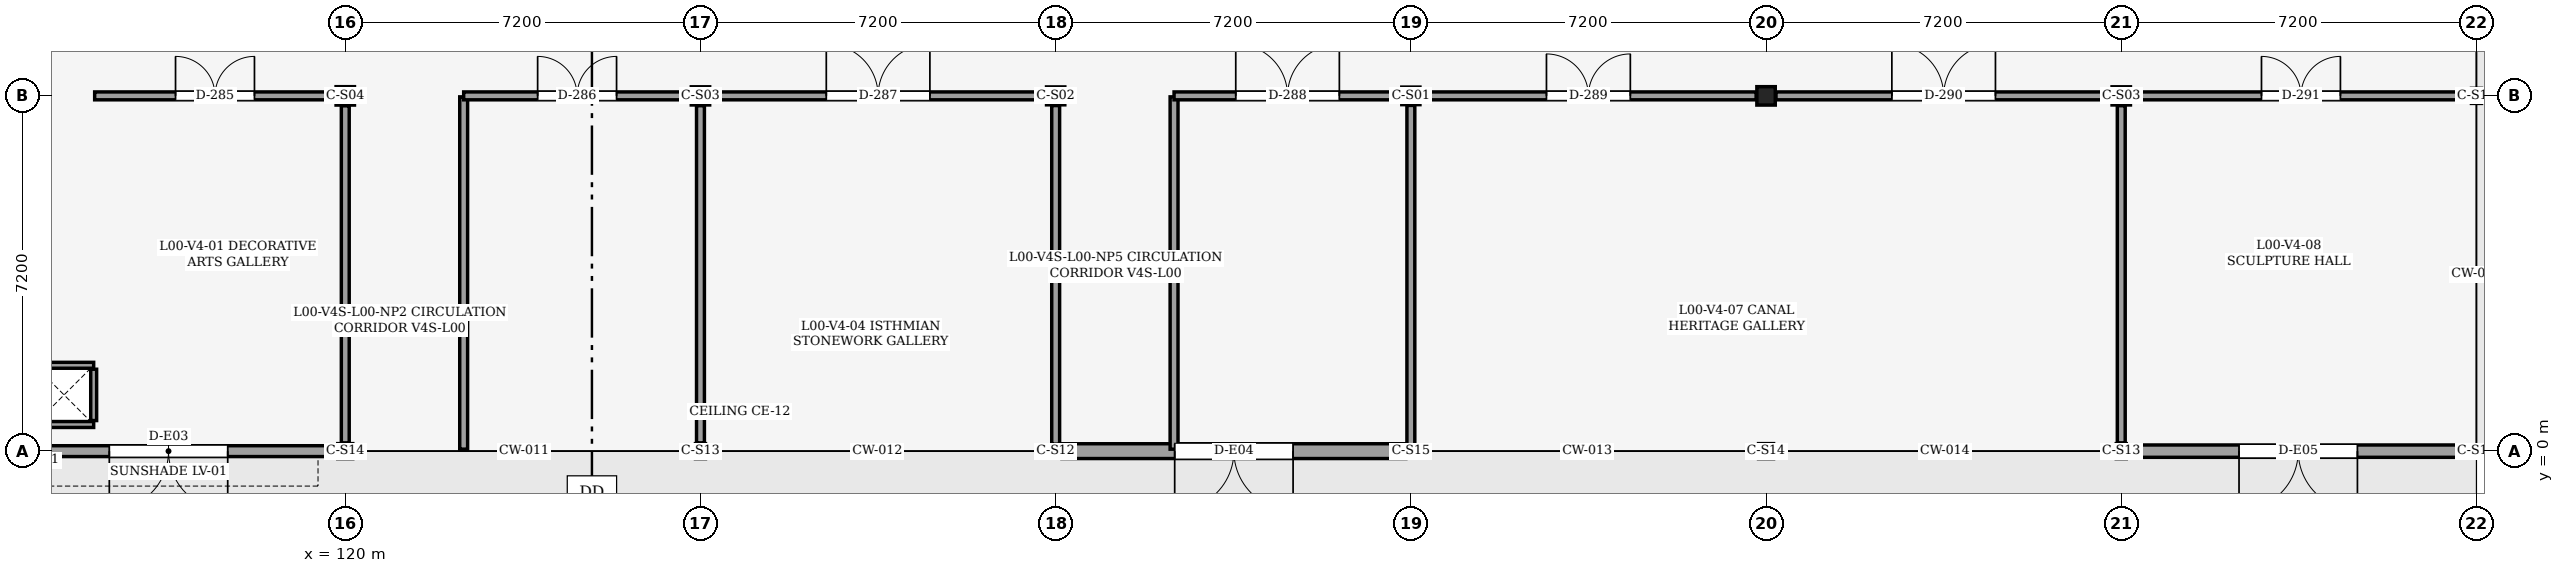
"""IFC4 building model, lengths in metres.
Left out: names, types, materials, properties, quantities, classifications, styles, units other than length and angle.
Written with IfcOpenShell. Run it as: python <this file> out.ifc"""

import sys

from ifc_helpers import new_model, si_unit, direction, frame, frame_2d, origin, origin_2d, place, context, subcontext, project, spatial, rectangle, hollow_rectangle, i_section, extrude, element, fill, save


model = new_model("IFC4")
c1 = context("Model", 3, precision=1e-05, world=origin(), true_north=direction((0.0, 1.0)))
c2 = subcontext(c1, "Body", "Model", "MODEL_VIEW")
j1 = project(units=[si_unit("LENGTHUNIT", "METRE"), si_unit("PLANEANGLEUNIT", "RADIAN")], contexts=[c1])
p1 = place(None, origin())
s1 = spatial("IfcSite", under=j1, at=p1, CompositionType="ELEMENT")
p2 = place(p1, origin())
s2 = spatial("IfcBuilding", under=s1, at=p2, CompositionType="ELEMENT")
p3 = place(p2, origin())
s3 = spatial("IfcBuildingStorey", under=s2, at=p3, CompositionType="ELEMENT", Elevation=0.0)
p4 = place(p3, frame((120.0, 0.0, 0.0), z_axis=(0.0, 0.0, 1.0), x_axis=(1.0, 0.0, 0.0)))
e1 = element("IfcColumn", 1, at=p4, inside=s3, PredefinedType="COLUMN", context=c2, shape_type="SweptSolid", body=[
    extrude(hollow_rectangle(XDim=0.305, YDim=0.305, WallThickness=0.016, OuterFilletRadius=0.032, at=origin_2d()), origin(), (0.0, 0.0, 1.0), 5.4),
])
p5 = place(p3, frame((120.0, 7.2, 0.0), z_axis=(0.0, 0.0, 1.0), x_axis=(1.0, 0.0, 0.0)))
e2 = element("IfcColumn", 2, at=p5, inside=s3, PredefinedType="COLUMN", context=c2, shape_type="SweptSolid", body=[
    extrude(i_section(OverallWidth=0.373, OverallDepth=0.373, WebThickness=0.016, FlangeThickness=0.026, FilletRadius=0.025, at=origin_2d()), origin(), (0.0, 0.0, 1.0), 5.4),
])
p6 = place(p3, frame((127.2, 0.0, 0.0), z_axis=(0.0, 0.0, 1.0), x_axis=(1.0, 0.0, 0.0)))
e3 = element("IfcColumn", 3, at=p6, inside=s3, PredefinedType="COLUMN", context=c2, shape_type="SweptSolid", body=[
    extrude(hollow_rectangle(XDim=0.203, YDim=0.305, WallThickness=0.013, OuterFilletRadius=0.025, at=origin_2d()), origin(), (0.0, 0.0, 1.0), 5.4),
])
p7 = place(p3, frame((127.2, 7.2, 0.0), z_axis=(0.0, 0.0, 1.0), x_axis=(1.0, 0.0, 0.0)))
e4 = element("IfcColumn", 4, at=p7, inside=s3, PredefinedType="COLUMN", context=c2, shape_type="SweptSolid", body=[
    extrude(i_section(OverallWidth=0.373, OverallDepth=0.368, WebThickness=0.015, FlangeThickness=0.024, FilletRadius=0.025, at=origin_2d()), origin(), (0.0, 0.0, 1.0), 5.4),
])
p8 = place(p3, frame((134.4, 0.0, 0.0), z_axis=(0.0, 0.0, 1.0), x_axis=(1.0, 0.0, 0.0)))
e5 = element("IfcColumn", 5, at=p8, inside=s3, PredefinedType="COLUMN", context=c2, shape_type="SweptSolid", body=[
    extrude(hollow_rectangle(XDim=0.254, YDim=0.254, WallThickness=0.013, OuterFilletRadius=0.025, at=origin_2d()), origin(), (0.0, 0.0, 1.0), 5.4),
])
p9 = place(p3, frame((134.4, 7.2, 0.0), z_axis=(0.0, 0.0, 1.0), x_axis=(1.0, 0.0, 0.0)))
e6 = element("IfcColumn", 6, at=p9, inside=s3, PredefinedType="COLUMN", context=c2, shape_type="SweptSolid", body=[
    extrude(i_section(OverallWidth=0.371, OverallDepth=0.363, WebThickness=0.013, FlangeThickness=0.022, FilletRadius=0.025, at=origin_2d()), origin(), (0.0, 0.0, 1.0), 5.4),
])
p10 = place(p3, frame((141.6, 0.0, 0.0), z_axis=(0.0, 0.0, 1.0), x_axis=(1.0, 0.0, 0.0)))
e7 = element("IfcColumn", 7, at=p10, inside=s3, PredefinedType="COLUMN", context=c2, shape_type="SweptSolid", body=[
    extrude(hollow_rectangle(XDim=0.203, YDim=0.203, WallThickness=0.013, OuterFilletRadius=0.025, at=origin_2d()), origin(), (0.0, 0.0, 1.0), 5.4),
])
p11 = place(p3, frame((141.6, 7.2, 0.0), z_axis=(0.0, 0.0, 1.0), x_axis=(1.0, 0.0, 0.0)))
e8 = element("IfcColumn", 8, at=p11, inside=s3, PredefinedType="COLUMN", context=c2, shape_type="SweptSolid", body=[
    extrude(i_section(OverallWidth=0.368, OverallDepth=0.356, WebThickness=0.011, FlangeThickness=0.018, FilletRadius=0.025, at=origin_2d()), origin(), (0.0, 0.0, 1.0), 5.4),
])
p12 = place(p3, frame((148.8, 0.0, 0.0), z_axis=(0.0, 0.0, 1.0), x_axis=(1.0, 0.0, 0.0)))
e9 = element("IfcColumn", 9, at=p12, inside=s3, PredefinedType="COLUMN", context=c2, shape_type="SweptSolid", body=[
    extrude(hollow_rectangle(XDim=0.305, YDim=0.305, WallThickness=0.016, OuterFilletRadius=0.032, at=origin_2d()), origin(), (0.0, 0.0, 1.0), 5.4),
])
p13 = place(p3, frame((148.8, 7.2, 0.0), z_axis=(0.0, 0.0, 1.0), x_axis=(1.0, 0.0, 0.0)))
e10 = element("IfcColumn", 10, at=p13, inside=s3, PredefinedType="COLUMN", context=c2, shape_type="SweptSolid", body=[
    extrude(i_section(OverallWidth=0.373, OverallDepth=0.373, WebThickness=0.016, FlangeThickness=0.026, FilletRadius=0.025, at=origin_2d()), origin(), (0.0, 0.0, 1.0), 5.4),
])
p14 = place(p3, frame((156.0, 0.0, 0.0), z_axis=(0.0, 0.0, 1.0), x_axis=(1.0, 0.0, 0.0)))
e11 = element("IfcColumn", 11, at=p14, inside=s3, PredefinedType="COLUMN", context=c2, shape_type="SweptSolid", body=[
    extrude(hollow_rectangle(XDim=0.203, YDim=0.305, WallThickness=0.013, OuterFilletRadius=0.025, at=origin_2d()), origin(), (0.0, 0.0, 1.0), 5.4),
])
p15 = place(p3, frame((156.0, 7.2, 0.0), z_axis=(0.0, 0.0, 1.0), x_axis=(1.0, 0.0, 0.0)))
e12 = element("IfcColumn", 12, at=p15, inside=s3, PredefinedType="COLUMN", context=c2, shape_type="SweptSolid", body=[
    extrude(i_section(OverallWidth=0.373, OverallDepth=0.368, WebThickness=0.015, FlangeThickness=0.024, FilletRadius=0.025, at=origin_2d()), origin(), (0.0, 0.0, 1.0), 5.4),
])
p16 = place(p3, frame((163.2, 0.0, 0.0), z_axis=(0.0, 0.0, 1.0), x_axis=(1.0, 0.0, 0.0)))
e13 = element("IfcColumn", 13, at=p16, inside=s3, PredefinedType="COLUMN", context=c2, shape_type="SweptSolid", body=[
    extrude(hollow_rectangle(XDim=0.254, YDim=0.254, WallThickness=0.013, OuterFilletRadius=0.025, at=origin_2d()), origin(), (0.0, 0.0, 1.0), 5.4),
])
p17 = place(p3, frame((163.2, 7.2, 0.0), z_axis=(0.0, 0.0, 1.0), x_axis=(1.0, 0.0, 0.0)))
e14 = element("IfcColumn", 14, at=p17, inside=s3, PredefinedType="COLUMN", context=c2, shape_type="SweptSolid", body=[
    extrude(hollow_rectangle(XDim=0.203, YDim=0.305, WallThickness=0.013, OuterFilletRadius=0.025, at=origin_2d()), origin(), (0.0, 0.0, 1.0), 5.4),
])
p18 = place(p3, frame((119.848, 0.0, 0.0), z_axis=(0.0, 0.0, 1.0), x_axis=(-1.0, 0.0, 0.0)))
e15 = element("IfcWall", 15, at=p18, inside=s3, PredefinedType="SOLIDWALL", context=c2, shape_type="SweptSolid", body=[
    extrude(rectangle(XDim=6.861, YDim=0.22, at=frame_2d((3.431, 0.0))), origin(), (0.0, 0.0, 1.0), 4.533),
])
p19 = place(p18, frame((2.231, 0.0, 0.0)))
e16 = element("IfcOpeningElement", 16, at=p19, cuts=e15, PredefinedType="OPENING", context=c2, shape_type="SweptSolid", body=[
    extrude(rectangle(XDim=2.4, YDim=2.5, at=frame_2d((1.2, 1.25))), frame((0.0, 0.12, 0.0), z_axis=(0.0, -1.0, 0.0), x_axis=(1.0, 0.0, 0.0)), (0.0, 0.0, 1.0), 0.24),
])
p20 = place(p3, frame((141.498, 0.0, 0.0), z_axis=(0.0, 0.0, 1.0), x_axis=(-1.0, 0.0, 0.0)))
e17 = element("IfcWall", 17, at=p20, inside=s3, PredefinedType="SOLIDWALL", context=c2, shape_type="SweptSolid", body=[
    extrude(rectangle(XDim=6.971, YDim=0.3, at=frame_2d((3.486, 0.0))), origin(), (0.0, 0.0, 1.0), 4.678),
])
p21 = place(p20, frame((2.286, 0.0, 0.0)))
e18 = element("IfcOpeningElement", 18, at=p21, cuts=e17, PredefinedType="OPENING", context=c2, shape_type="SweptSolid", body=[
    extrude(rectangle(XDim=2.4, YDim=2.5, at=frame_2d((1.2, 1.25))), frame((0.0, 0.16, 0.0), z_axis=(0.0, -1.0, 0.0), x_axis=(1.0, 0.0, 0.0)), (0.0, 0.0, 1.0), 0.321),
])
p22 = place(p3, frame((163.073, 0.0, 0.0), z_axis=(0.0, 0.0, 1.0), x_axis=(-1.0, 0.0, 0.0)))
e19 = element("IfcWall", 19, at=p22, inside=s3, PredefinedType="SOLIDWALL", context=c2, shape_type="SweptSolid", body=[
    extrude(rectangle(XDim=6.971, YDim=0.25, at=frame_2d((3.486, 0.0))), origin(), (0.0, 0.0, 1.0), 4.607),
])
p23 = place(p22, frame((2.286, 0.0, 0.0)))
e20 = element("IfcOpeningElement", 20, at=p23, cuts=e19, PredefinedType="OPENING", context=c2, shape_type="SweptSolid", body=[
    extrude(rectangle(XDim=2.4, YDim=2.5, at=frame_2d((1.2, 1.25))), frame((0.0, 0.135, 0.0), z_axis=(0.0, -1.0, 0.0), x_axis=(1.0, 0.0, 0.0)), (0.0, 0.0, 1.0), 0.271),
])
for number, where, z_axis, x_axis in (
    (21, (113.7, 0.54, 0.0), (0.0, 0.0, 1.0), (1.0, 0.0, 0.0)),
    (22, (113.7, 1.74, 0.0), (0.0, 0.0, 1.0), (1.0, 0.0, 0.0)),
):
    element("IfcWall", number, at=place(p3, frame(where, z_axis=z_axis, x_axis=x_axis)), inside=s3, PredefinedType="PARTITIONING", context=c2, shape_type="SweptSolid", body=[
        extrude(rectangle(XDim=1.2, YDim=0.12, at=frame_2d((0.6, 0.0))), origin(), (0.0, 0.0, 1.0), 5.16),
    ])
p24 = place(p3, frame((114.9, 0.62, 0.0), z_axis=(0.0, 0.0, 1.0), x_axis=(0.0, 1.0, 0.0)))
e23 = element("IfcWall", 23, at=p24, inside=s3, PredefinedType="PARTITIONING", context=c2, shape_type="SweptSolid", body=[
    extrude(rectangle(XDim=1.04, YDim=0.12, at=frame_2d((0.52, 0.0))), origin(), (0.0, 0.0, 1.0), 5.16),
])
p25 = place(p3, frame((114.92, 7.2, 0.0), z_axis=(0.0, 0.0, 1.0), x_axis=(1.0, 0.0, 0.0)))
e24 = element("IfcWall", 24, at=p25, inside=s3, PredefinedType="PARTITIONING", context=c2, shape_type="SweptSolid", body=[
    extrude(rectangle(XDim=4.879, YDim=0.16, at=frame_2d((2.439, 0.0))), origin(), (0.0, 0.0, 1.0), 4.591),
])
p26 = place(p25, frame((1.639, 0.0, 0.0)))
e25 = element("IfcOpeningElement", 25, at=p26, cuts=e24, PredefinedType="OPENING", context=c2, shape_type="SweptSolid", body=[
    extrude(rectangle(XDim=1.6, YDim=2.35, at=frame_2d((0.8, 1.175))), frame((0.0, 0.09, 0.0), z_axis=(0.0, -1.0, 0.0), x_axis=(1.0, 0.0, 0.0)), (0.0, 0.0, 1.0), 0.18),
])
p27 = place(p3, frame((120.0, 0.167, 0.0), z_axis=(0.0, 0.0, 1.0), x_axis=(0.0, 1.0, 0.0)))
e26 = element("IfcWall", 26, at=p27, inside=s3, PredefinedType="PARTITIONING", context=c2, shape_type="SweptSolid", body=[
    extrude(rectangle(XDim=6.831, YDim=0.16, at=frame_2d((3.416, 0.0))), origin(), (0.0, 0.0, 1.0), 4.533),
])
p28 = place(p3, frame((122.4, 0.04, 0.0), z_axis=(0.0, 0.0, 1.0), x_axis=(0.0, 1.0, 0.0)))
e27 = element("IfcWall", 27, at=p28, inside=s3, PredefinedType="PARTITIONING", context=c2, shape_type="SweptSolid", body=[
    extrude(rectangle(XDim=7.14, YDim=0.16, at=frame_2d((3.57, 0.0))), origin(), (0.0, 0.0, 1.0), 5.14),
])
p29 = place(p3, frame((122.4, 7.2, 0.0), z_axis=(0.0, 0.0, 1.0), x_axis=(1.0, 0.0, 0.0)))
e28 = element("IfcWall", 28, at=p29, inside=s3, PredefinedType="PARTITIONING", context=c2, shape_type="SweptSolid", body=[
    extrude(rectangle(XDim=4.599, YDim=0.16, at=frame_2d((2.299, 0.0))), origin(), (0.0, 0.0, 1.0), 4.607),
])
p30 = place(p29, frame((1.499, 0.0, 0.0)))
e29 = element("IfcOpeningElement", 29, at=p30, cuts=e28, PredefinedType="OPENING", context=c2, shape_type="SweptSolid", body=[
    extrude(rectangle(XDim=1.6, YDim=2.35, at=frame_2d((0.8, 1.175))), frame((0.0, 0.09, 0.0), z_axis=(0.0, -1.0, 0.0), x_axis=(1.0, 0.0, 0.0)), (0.0, 0.0, 1.0), 0.18),
])
p31 = place(p3, frame((127.2, 0.167, 0.0), z_axis=(0.0, 0.0, 1.0), x_axis=(0.0, 1.0, 0.0)))
e30 = element("IfcWall", 30, at=p31, inside=s3, PredefinedType="PARTITIONING", context=c2, shape_type="SweptSolid", body=[
    extrude(rectangle(XDim=6.833, YDim=0.16, at=frame_2d((3.417, 0.0))), origin(), (0.0, 0.0, 1.0), 4.607),
])
p32 = place(p3, frame((127.402, 7.2, 0.0), z_axis=(0.0, 0.0, 1.0), x_axis=(1.0, 0.0, 0.0)))
e31 = element("IfcWall", 31, at=p32, inside=s3, PredefinedType="PARTITIONING", context=c2, shape_type="SweptSolid", body=[
    extrude(rectangle(XDim=6.798, YDim=0.16, at=frame_2d((3.399, 0.0))), origin(), (0.0, 0.0, 1.0), 4.678),
])
p33 = place(p32, frame((2.349, 0.0, 0.0)))
e32 = element("IfcOpeningElement", 32, at=p33, cuts=e31, PredefinedType="OPENING", context=c2, shape_type="SweptSolid", body=[
    extrude(rectangle(XDim=2.1, YDim=2.5, at=frame_2d((1.05, 1.25))), frame((0.0, 0.09, 0.0), z_axis=(0.0, -1.0, 0.0), x_axis=(1.0, 0.0, 0.0)), (0.0, 0.0, 1.0), 0.18),
])
p34 = place(p3, frame((134.4, 0.142, 0.0), z_axis=(0.0, 0.0, 1.0), x_axis=(0.0, 1.0, 0.0)))
e33 = element("IfcWall", 33, at=p34, inside=s3, PredefinedType="PARTITIONING", context=c2, shape_type="SweptSolid", body=[
    extrude(rectangle(XDim=6.861, YDim=0.16, at=frame_2d((3.431, 0.0))), origin(), (0.0, 0.0, 1.0), 4.678),
])
p35 = place(p3, frame((136.8, 0.04, 0.0), z_axis=(0.0, 0.0, 1.0), x_axis=(0.0, 1.0, 0.0)))
e34 = element("IfcWall", 34, at=p35, inside=s3, PredefinedType="PARTITIONING", context=c2, shape_type="SweptSolid", body=[
    extrude(rectangle(XDim=7.14, YDim=0.16, at=frame_2d((3.57, 0.0))), origin(), (0.0, 0.0, 1.0), 5.14),
])
p36 = place(p3, frame((136.8, 7.2, 0.0), z_axis=(0.0, 0.0, 1.0), x_axis=(1.0, 0.0, 0.0)))
e35 = element("IfcWall", 35, at=p36, inside=s3, PredefinedType="PARTITIONING", context=c2, shape_type="SweptSolid", body=[
    extrude(rectangle(XDim=4.601, YDim=0.16, at=frame_2d((2.3, 0.0))), origin(), (0.0, 0.0, 1.0), 4.533),
])
p37 = place(p36, frame((1.25, 0.0, 0.0)))
e36 = element("IfcOpeningElement", 36, at=p37, cuts=e35, PredefinedType="OPENING", context=c2, shape_type="SweptSolid", body=[
    extrude(rectangle(XDim=2.1, YDim=2.5, at=frame_2d((1.05, 1.25))), frame((0.0, 0.09, 0.0), z_axis=(0.0, -1.0, 0.0), x_axis=(1.0, 0.0, 0.0)), (0.0, 0.0, 1.0), 0.18),
])
p38 = place(p3, frame((141.6, 0.117, 0.0), z_axis=(0.0, 0.0, 1.0), x_axis=(0.0, 1.0, 0.0)))
e37 = element("IfcWall", 37, at=p38, inside=s3, PredefinedType="PARTITIONING", context=c2, shape_type="SweptSolid", body=[
    extrude(rectangle(XDim=6.89, YDim=0.16, at=frame_2d((3.445, 0.0))), origin(), (0.0, 0.0, 1.0), 4.528),
])
p39 = place(p3, frame((141.799, 7.2, 0.0), z_axis=(0.0, 0.0, 1.0), x_axis=(1.0, 0.0, 0.0)))
e38 = element("IfcWall", 38, at=p39, inside=s3, PredefinedType="PARTITIONING", context=c2, shape_type="SweptSolid", body=[
    extrude(rectangle(XDim=6.799, YDim=0.16, at=frame_2d((3.4, 0.0))), origin(), (0.0, 0.0, 1.0), 4.591),
])
p40 = place(p39, frame((2.55, 0.0, 0.0)))
e39 = element("IfcOpeningElement", 39, at=p40, cuts=e38, PredefinedType="OPENING", context=c2, shape_type="SweptSolid", body=[
    extrude(rectangle(XDim=1.7, YDim=2.4, at=frame_2d((0.85, 1.2))), frame((0.0, 0.09, 0.0), z_axis=(0.0, -1.0, 0.0), x_axis=(1.0, 0.0, 0.0)), (0.0, 0.0, 1.0), 0.18),
])
p41 = place(p3, frame((149.001, 7.2, 0.0), z_axis=(0.0, 0.0, 1.0), x_axis=(1.0, 0.0, 0.0)))
e40 = element("IfcWall", 40, at=p41, inside=s3, PredefinedType="PARTITIONING", context=c2, shape_type="SweptSolid", body=[
    extrude(rectangle(XDim=6.797, YDim=0.16, at=frame_2d((3.398, 0.0))), origin(), (0.0, 0.0, 1.0), 4.607),
])
p42 = place(p41, frame((2.348, 0.0, 0.0)))
e41 = element("IfcOpeningElement", 41, at=p42, cuts=e40, PredefinedType="OPENING", context=c2, shape_type="SweptSolid", body=[
    extrude(rectangle(XDim=2.1, YDim=2.5, at=frame_2d((1.05, 1.25))), frame((0.0, 0.09, 0.0), z_axis=(0.0, -1.0, 0.0), x_axis=(1.0, 0.0, 0.0)), (0.0, 0.0, 1.0), 0.18),
])
p43 = place(p3, frame((156.0, 0.167, 0.0), z_axis=(0.0, 0.0, 1.0), x_axis=(0.0, 1.0, 0.0)))
e42 = element("IfcWall", 42, at=p43, inside=s3, PredefinedType="PARTITIONING", context=c2, shape_type="SweptSolid", body=[
    extrude(rectangle(XDim=6.833, YDim=0.16, at=frame_2d((3.417, 0.0))), origin(), (0.0, 0.0, 1.0), 4.607),
])
p44 = place(p3, frame((156.201, 7.2, 0.0), z_axis=(0.0, 0.0, 1.0), x_axis=(1.0, 0.0, 0.0)))
e43 = element("IfcWall", 43, at=p44, inside=s3, PredefinedType="PARTITIONING", context=c2, shape_type="SweptSolid", body=[
    extrude(rectangle(XDim=6.882, YDim=0.16, at=frame_2d((3.441, 0.0))), origin(), (0.0, 0.0, 1.0), 4.678),
])
p45 = place(p44, frame((2.641, 0.0, 0.0)))
e44 = element("IfcOpeningElement", 44, at=p45, cuts=e43, PredefinedType="OPENING", context=c2, shape_type="SweptSolid", body=[
    extrude(rectangle(XDim=1.6, YDim=2.35, at=frame_2d((0.8, 1.175))), frame((0.0, 0.09, 0.0), z_axis=(0.0, -1.0, 0.0), x_axis=(1.0, 0.0, 0.0)), (0.0, 0.0, 1.0), 0.18),
])
p46 = place(p19, origin())
e45 = element("IfcDoor", 45, at=p46, inside=s3, OperationType="DOUBLE_DOOR_SINGLE_SWING", PredefinedType="DOOR", context=c2, shape_type="SweptSolid", body=[
    extrude(rectangle(XDim=2.4, YDim=2.5, at=frame_2d((1.2, 1.25))), frame((0.0, 0.025, 0.0), z_axis=(0.0, -1.0, 0.0), x_axis=(1.0, 0.0, 0.0)), (0.0, 0.0, 1.0), 0.05),
])
fill(e16, e45)
p47 = place(p21, origin())
e46 = element("IfcDoor", 46, at=p47, inside=s3, OperationType="DOUBLE_DOOR_SINGLE_SWING", PredefinedType="DOOR", context=c2, shape_type="SweptSolid", body=[
    extrude(rectangle(XDim=2.4, YDim=2.5, at=frame_2d((1.2, 1.25))), frame((0.0, 0.025, 0.0), z_axis=(0.0, -1.0, 0.0), x_axis=(1.0, 0.0, 0.0)), (0.0, 0.0, 1.0), 0.05),
])
fill(e18, e46)
p48 = place(p23, origin())
e47 = element("IfcDoor", 47, at=p48, inside=s3, OperationType="DOUBLE_DOOR_SINGLE_SWING", PredefinedType="DOOR", context=c2, shape_type="SweptSolid", body=[
    extrude(rectangle(XDim=2.4, YDim=2.5, at=frame_2d((1.2, 1.25))), frame((0.0, 0.025, 0.0), z_axis=(0.0, -1.0, 0.0), x_axis=(1.0, 0.0, 0.0)), (0.0, 0.0, 1.0), 0.05),
])
fill(e20, e47)
p49 = place(p26, origin())
e48 = element("IfcDoor", 48, at=p49, inside=s3, OperationType="DOUBLE_DOOR_SINGLE_SWING", PredefinedType="DOOR", context=c2, shape_type="SweptSolid", body=[
    extrude(rectangle(XDim=1.6, YDim=2.35, at=frame_2d((0.8, 1.175))), frame((0.0, 0.025, 0.0), z_axis=(0.0, -1.0, 0.0), x_axis=(1.0, 0.0, 0.0)), (0.0, 0.0, 1.0), 0.05),
])
fill(e25, e48)
p50 = place(p30, origin())
e49 = element("IfcDoor", 49, at=p50, inside=s3, OperationType="DOUBLE_DOOR_SINGLE_SWING", PredefinedType="DOOR", context=c2, shape_type="SweptSolid", body=[
    extrude(rectangle(XDim=1.6, YDim=2.35, at=frame_2d((0.8, 1.175))), frame((0.0, 0.025, 0.0), z_axis=(0.0, -1.0, 0.0), x_axis=(1.0, 0.0, 0.0)), (0.0, 0.0, 1.0), 0.05),
])
fill(e29, e49)
p51 = place(p33, origin())
e50 = element("IfcDoor", 50, at=p51, inside=s3, OperationType="DOUBLE_DOOR_SINGLE_SWING", PredefinedType="DOOR", context=c2, shape_type="SweptSolid", body=[
    extrude(rectangle(XDim=2.1, YDim=2.5, at=frame_2d((1.05, 1.25))), frame((0.0, 0.025, 0.0), z_axis=(0.0, -1.0, 0.0), x_axis=(1.0, 0.0, 0.0)), (0.0, 0.0, 1.0), 0.05),
])
fill(e32, e50)
p52 = place(p37, origin())
e51 = element("IfcDoor", 51, at=p52, inside=s3, OperationType="DOUBLE_DOOR_SINGLE_SWING", PredefinedType="DOOR", context=c2, shape_type="SweptSolid", body=[
    extrude(rectangle(XDim=2.1, YDim=2.5, at=frame_2d((1.05, 1.25))), frame((0.0, 0.025, 0.0), z_axis=(0.0, -1.0, 0.0), x_axis=(1.0, 0.0, 0.0)), (0.0, 0.0, 1.0), 0.05),
])
fill(e36, e51)
p53 = place(p40, origin())
e52 = element("IfcDoor", 52, at=p53, inside=s3, OperationType="DOUBLE_DOOR_SINGLE_SWING", PredefinedType="DOOR", context=c2, shape_type="SweptSolid", body=[
    extrude(rectangle(XDim=1.7, YDim=2.4, at=frame_2d((0.85, 1.2))), frame((0.0, 0.025, 0.0), z_axis=(0.0, -1.0, 0.0), x_axis=(1.0, 0.0, 0.0)), (0.0, 0.0, 1.0), 0.05),
])
fill(e39, e52)
p54 = place(p42, origin())
e53 = element("IfcDoor", 53, at=p54, inside=s3, OperationType="DOUBLE_DOOR_SINGLE_SWING", PredefinedType="DOOR", context=c2, shape_type="SweptSolid", body=[
    extrude(rectangle(XDim=2.1, YDim=2.5, at=frame_2d((1.05, 1.25))), frame((0.0, 0.025, 0.0), z_axis=(0.0, -1.0, 0.0), x_axis=(1.0, 0.0, 0.0)), (0.0, 0.0, 1.0), 0.05),
])
fill(e41, e53)
p55 = place(p45, origin())
e54 = element("IfcDoor", 54, at=p55, inside=s3, OperationType="DOUBLE_DOOR_SINGLE_SWING", PredefinedType="DOOR", context=c2, shape_type="SweptSolid", body=[
    extrude(rectangle(XDim=1.6, YDim=2.35, at=frame_2d((0.8, 1.175))), frame((0.0, 0.025, 0.0), z_axis=(0.0, -1.0, 0.0), x_axis=(1.0, 0.0, 0.0)), (0.0, 0.0, 1.0), 0.05),
])
fill(e44, e54)
save(model, sys.argv[1])
